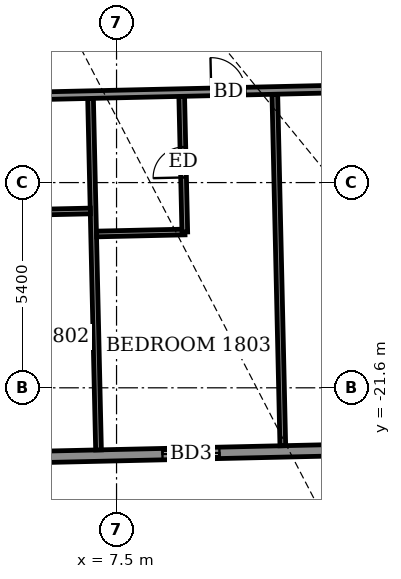
"""IFC4 building model, lengths in metres.
Left out: names, types, materials, properties, quantities, classifications, styles, units other than length and angle.
Written with IfcOpenShell. Run it as: python <this file> out.ifc"""

import sys

from ifc_helpers import new_model, si_unit, direction, frame, frame_2d, origin, place, context, subcontext, project, spatial, rectangle, extrude, element, fill, save


model = new_model("IFC4")
c1 = context("Model", 3, precision=1e-05, world=origin(), true_north=direction((0.0, 1.0)))
c2 = subcontext(c1, "Body", "Model", "MODEL_VIEW")
j1 = project(units=[si_unit("LENGTHUNIT", "METRE"), si_unit("PLANEANGLEUNIT", "RADIAN")], contexts=[c1])
p1 = place(None, origin())
s1 = spatial("IfcSite", under=j1, at=p1, CompositionType="ELEMENT")
p2 = place(p1, origin())
s2 = spatial("IfcBuilding", under=s1, at=p2, CompositionType="ELEMENT")
p3 = place(p2, frame((0.0, 0.0, 74.7)))
s3 = spatial("IfcBuildingStorey", under=s2, at=p3, CompositionType="ELEMENT", Elevation=74.7)
p4 = place(p3, frame((-21.409, -24.029, 0.0), z_axis=(0.0, 0.0, 1.0), x_axis=(0.999742634032, 0.022686244721, 0.0)))
e1 = element("IfcWall", 1, at=p4, inside=s3, PredefinedType="SOLIDWALL", context=c2, shape_type="SweptSolid", body=[
    extrude(rectangle(XDim=46.372, YDim=0.3, at=frame_2d((23.186, 0.0))), origin(), (0.0, 0.0, 1.0), 2.1),
])
p5 = place(p4, frame((3.25, 0.0, 0.0)))
e2 = element("IfcOpeningElement", 2, at=p5, cuts=e1, PredefinedType="OPENING", context=c2, shape_type="SweptSolid", body=[
    extrude(rectangle(XDim=1.5, YDim=2.0, at=frame_2d((0.75, 1.0))), frame((0.0, 0.16, 0.0), z_axis=(0.0, -1.0, 0.0), x_axis=(1.0, 0.0, 0.0)), (0.0, 0.0, 1.0), 0.32),
])
p6 = place(p4, frame((10.575, 0.0, 0.5)))
e3 = element("IfcOpeningElement", 3, at=p6, cuts=e1, PredefinedType="OPENING", context=c2, shape_type="SweptSolid", body=[
    extrude(rectangle(XDim=1.2, YDim=1.1, at=frame_2d((0.6, 0.55))), frame((0.0, 0.16, 0.0), z_axis=(0.0, -1.0, 0.0), x_axis=(1.0, 0.0, 0.0)), (0.0, 0.0, 1.0), 0.32),
])
p7 = place(p4, frame((15.95, 0.0, 0.5)))
e4 = element("IfcOpeningElement", 4, at=p7, cuts=e1, PredefinedType="OPENING", context=c2, shape_type="SweptSolid", body=[
    extrude(rectangle(XDim=1.2, YDim=1.1, at=frame_2d((0.6, 0.55))), frame((0.0, 0.16, 0.0), z_axis=(0.0, -1.0, 0.0), x_axis=(1.0, 0.0, 0.0)), (0.0, 0.0, 1.0), 0.32),
])
p8 = place(p4, frame((20.575, 0.0, 0.0)))
e5 = element("IfcOpeningElement", 5, at=p8, cuts=e1, PredefinedType="OPENING", context=c2, shape_type="SweptSolid", body=[
    extrude(rectangle(XDim=1.5, YDim=2.0, at=frame_2d((0.75, 1.0))), frame((0.0, 0.16, 0.0), z_axis=(0.0, -1.0, 0.0), x_axis=(1.0, 0.0, 0.0)), (0.0, 0.0, 1.0), 0.32),
])
p9 = place(p4, frame((25.35, 0.0, 0.0)))
e6 = element("IfcOpeningElement", 6, at=p9, cuts=e1, PredefinedType="OPENING", context=c2, shape_type="SweptSolid", body=[
    extrude(rectangle(XDim=1.5, YDim=2.0, at=frame_2d((0.75, 1.0))), frame((0.0, 0.16, 0.0), z_axis=(0.0, -1.0, 0.0), x_axis=(1.0, 0.0, 0.0)), (0.0, 0.0, 1.0), 0.32),
])
p10 = place(p4, frame((30.125, 0.0, 0.0)))
e7 = element("IfcOpeningElement", 7, at=p10, cuts=e1, PredefinedType="OPENING", context=c2, shape_type="SweptSolid", body=[
    extrude(rectangle(XDim=1.5, YDim=2.0, at=frame_2d((0.75, 1.0))), frame((0.0, 0.16, 0.0), z_axis=(0.0, -1.0, 0.0), x_axis=(1.0, 0.0, 0.0)), (0.0, 0.0, 1.0), 0.32),
])
p11 = place(p4, frame((36.975, 0.0, 0.5)))
e8 = element("IfcOpeningElement", 8, at=p11, cuts=e1, PredefinedType="OPENING", context=c2, shape_type="SweptSolid", body=[
    extrude(rectangle(XDim=1.2, YDim=1.1, at=frame_2d((0.6, 0.55))), frame((0.0, 0.16, 0.0), z_axis=(0.0, -1.0, 0.0), x_axis=(1.0, 0.0, 0.0)), (0.0, 0.0, 1.0), 0.32),
])
p12 = place(p4, frame((43.115, 0.0, 0.5)))
e9 = element("IfcOpeningElement", 9, at=p12, cuts=e1, PredefinedType="OPENING", context=c2, shape_type="SweptSolid", body=[
    extrude(rectangle(XDim=1.2, YDim=1.1, at=frame_2d((0.6, 0.55))), frame((0.0, 0.16, 0.0), z_axis=(0.0, -1.0, 0.0), x_axis=(1.0, 0.0, 0.0)), (0.0, 0.0, 1.0), 0.32),
])
p13 = place(p3, frame((7.026, -23.234, 0.0), z_axis=(0.0, 0.0, 1.0), x_axis=(-0.022698023584, 0.999742366675, 0.0)))
e10 = element("IfcWall", 10, at=p13, inside=s3, PredefinedType="PARTITIONING", context=c2, shape_type="SweptSolid", body=[
    extrude(rectangle(XDim=9.25, YDim=0.15, at=frame_2d((4.625, 0.0))), origin(), (0.0, 0.0, 1.0), 2.35),
])
p14 = place(p3, frame((11.875, -23.124, 0.0), z_axis=(0.0, 0.0, 1.0), x_axis=(-0.022697424684, 0.999742380272, 0.0)))
e11 = element("IfcWall", 11, at=p14, inside=s3, PredefinedType="PARTITIONING", context=c2, shape_type="SweptSolid", body=[
    extrude(rectangle(XDim=9.25, YDim=0.15, at=frame_2d((4.625, 0.0))), origin(), (0.0, 0.0, 1.0), 2.1),
])
p15 = place(p3, frame((6.976, -17.553, 0.0), z_axis=(0.0, 0.0, 1.0), x_axis=(0.999740260747, 0.02279059109, 0.0)))
e12 = element("IfcWall", 12, at=p15, inside=s3, PredefinedType="PARTITIONING", context=c2, shape_type="SweptSolid", body=[
    extrude(rectangle(XDim=2.324, YDim=0.15, at=frame_2d((1.162, 0.0))), origin(), (0.0, 0.0, 1.0), 2.35),
])
p16 = place(p3, frame((9.296, -17.5, 0.0), z_axis=(0.0, 0.0, 1.0), x_axis=(-0.022635966146, 0.999743773692, 0.0)))
e13 = element("IfcWall", 13, at=p16, inside=s3, PredefinedType="PARTITIONING", context=c2, shape_type="SweptSolid", body=[
    extrude(rectangle(XDim=3.57, YDim=0.15, at=frame_2d((1.785, 0.0))), origin(), (0.0, 0.0, 1.0), 2.35),
])
p17 = place(p16, frame((1.435, 0.0, 0.0)))
e14 = element("IfcOpeningElement", 14, at=p17, cuts=e13, PredefinedType="OPENING", context=c2, shape_type="SweptSolid", body=[
    extrude(rectangle(XDim=0.8, YDim=2.1, at=frame_2d((0.4, 1.05))), frame((0.0, 0.085, 0.0), z_axis=(0.0, -1.0, 0.0), x_axis=(1.0, 0.0, 0.0)), (0.0, 0.0, 1.0), 0.17),
])
p18 = place(p3, frame((4.488, -16.999, 0.0), z_axis=(0.0, 0.0, 1.0), x_axis=(0.999749744571, 0.022370700241, 0.0)))
e15 = element("IfcWall", 15, at=p18, inside=s3, PredefinedType="PARTITIONING", context=c2, shape_type="SweptSolid", body=[
    extrude(rectangle(XDim=2.324, YDim=0.15, at=frame_2d((1.162, 0.0))), origin(), (0.0, 0.0, 1.0), 2.45),
])
p19 = place(p3, frame((-24.88, -14.605, 0.0), z_axis=(0.0, 0.0, 1.0), x_axis=(0.999742652859, 0.022685415006, 0.0)))
e16 = element("IfcWall", 16, at=p19, inside=s3, PredefinedType="PARTITIONING", context=c2, shape_type="SweptSolid", body=[
    extrude(rectangle(XDim=53.778, YDim=0.2, at=frame_2d((26.889, 0.0))), origin(), (0.0, 0.0, 1.0), 2.1),
])
p20 = place(p19, frame((3.256, 0.0, 0.0)))
e17 = element("IfcOpeningElement", 17, at=p20, cuts=e16, PredefinedType="OPENING", context=c2, shape_type="SweptSolid", body=[
    extrude(rectangle(XDim=1.0, YDim=2.1, at=frame_2d((0.5, 1.05))), frame((0.0, 0.11, 0.0), z_axis=(0.0, -1.0, 0.0), x_axis=(1.0, 0.0, 0.0)), (0.0, 0.0, 1.0), 0.22),
])
p21 = place(p19, frame((9.756, 0.0, 0.0)))
e18 = element("IfcOpeningElement", 18, at=p21, cuts=e16, PredefinedType="OPENING", context=c2, shape_type="SweptSolid", body=[
    extrude(rectangle(XDim=0.9, YDim=2.1, at=frame_2d((0.45, 1.05))), frame((0.0, 0.11, 0.0), z_axis=(0.0, -1.0, 0.0), x_axis=(1.0, 0.0, 0.0)), (0.0, 0.0, 1.0), 0.22),
])
p22 = place(p19, frame((15.131, 0.0, 0.0)))
e19 = element("IfcOpeningElement", 19, at=p22, cuts=e16, PredefinedType="OPENING", context=c2, shape_type="SweptSolid", body=[
    extrude(rectangle(XDim=1.0, YDim=2.1, at=frame_2d((0.5, 1.05))), frame((0.0, 0.11, 0.0), z_axis=(0.0, -1.0, 0.0), x_axis=(1.0, 0.0, 0.0)), (0.0, 0.0, 1.0), 0.22),
])
p23 = place(p19, frame((12.156, 0.0, 0.0)))
e20 = element("IfcOpeningElement", 20, at=p23, cuts=e16, PredefinedType="OPENING", context=c2, shape_type="SweptSolid", body=[
    extrude(rectangle(XDim=0.9, YDim=2.1, at=frame_2d((0.45, 1.05))), frame((0.0, 0.11, 0.0), z_axis=(0.0, -1.0, 0.0), x_axis=(1.0, 0.0, 0.0)), (0.0, 0.0, 1.0), 0.22),
])
p24 = place(p19, frame((18.006, 0.0, 0.0)))
e21 = element("IfcOpeningElement", 21, at=p24, cuts=e16, PredefinedType="OPENING", context=c2, shape_type="SweptSolid", body=[
    extrude(rectangle(XDim=1.0, YDim=2.1, at=frame_2d((0.5, 1.05))), frame((0.0, 0.11, 0.0), z_axis=(0.0, -1.0, 0.0), x_axis=(1.0, 0.0, 0.0)), (0.0, 0.0, 1.0), 0.22),
])
p25 = place(p19, frame((20.406, 0.0, 0.0)))
e22 = element("IfcOpeningElement", 22, at=p25, cuts=e16, PredefinedType="OPENING", context=c2, shape_type="SweptSolid", body=[
    extrude(rectangle(XDim=0.9, YDim=2.1, at=frame_2d((0.45, 1.05))), frame((0.0, 0.11, 0.0), z_axis=(0.0, -1.0, 0.0), x_axis=(1.0, 0.0, 0.0)), (0.0, 0.0, 1.0), 0.22),
])
p26 = place(p19, frame((25.331, 0.0, 0.0)))
e23 = element("IfcOpeningElement", 23, at=p26, cuts=e16, PredefinedType="OPENING", context=c2, shape_type="SweptSolid", body=[
    extrude(rectangle(XDim=0.9, YDim=2.1, at=frame_2d((0.45, 1.05))), frame((0.0, 0.11, 0.0), z_axis=(0.0, -1.0, 0.0), x_axis=(1.0, 0.0, 0.0)), (0.0, 0.0, 1.0), 0.22),
])
p27 = place(p19, frame((27.706, 0.0, 0.0)))
e24 = element("IfcOpeningElement", 24, at=p27, cuts=e16, PredefinedType="OPENING", context=c2, shape_type="SweptSolid", body=[
    extrude(rectangle(XDim=0.9, YDim=2.1, at=frame_2d((0.45, 1.05))), frame((0.0, 0.11, 0.0), z_axis=(0.0, -1.0, 0.0), x_axis=(1.0, 0.0, 0.0)), (0.0, 0.0, 1.0), 0.22),
])
p28 = place(p19, frame((34.881, 0.0, 0.0)))
e25 = element("IfcOpeningElement", 25, at=p28, cuts=e16, PredefinedType="OPENING", context=c2, shape_type="SweptSolid", body=[
    extrude(rectangle(XDim=0.9, YDim=2.1, at=frame_2d((0.45, 1.05))), frame((0.0, 0.11, 0.0), z_axis=(0.0, -1.0, 0.0), x_axis=(1.0, 0.0, 0.0)), (0.0, 0.0, 1.0), 0.22),
])
p29 = place(p19, frame((40.331, 0.0, 0.0)))
e26 = element("IfcOpeningElement", 26, at=p29, cuts=e16, PredefinedType="OPENING", context=c2, shape_type="SweptSolid", body=[
    extrude(rectangle(XDim=1.0, YDim=2.1, at=frame_2d((0.5, 1.05))), frame((0.0, 0.11, 0.0), z_axis=(0.0, -1.0, 0.0), x_axis=(1.0, 0.0, 0.0)), (0.0, 0.0, 1.0), 0.22),
])
p30 = place(p19, frame((50.842, 0.0, 0.0)))
e27 = element("IfcOpeningElement", 27, at=p30, cuts=e16, PredefinedType="OPENING", context=c2, shape_type="SweptSolid", body=[
    extrude(rectangle(XDim=1.0, YDim=2.1, at=frame_2d((0.5, 1.05))), frame((0.0, 0.11, 0.0), z_axis=(0.0, -1.0, 0.0), x_axis=(1.0, 0.0, 0.0)), (0.0, 0.0, 1.0), 0.22),
])
p31 = place(p19, frame((45.856, 0.0, 0.0)))
e28 = element("IfcOpeningElement", 28, at=p31, cuts=e16, PredefinedType="OPENING", context=c2, shape_type="SweptSolid", body=[
    extrude(rectangle(XDim=0.9, YDim=2.1, at=frame_2d((0.45, 1.05))), frame((0.0, 0.11, 0.0), z_axis=(0.0, -1.0, 0.0), x_axis=(1.0, 0.0, 0.0)), (0.0, 0.0, 1.0), 0.22),
])
p32 = place(p10, origin())
e29 = element("IfcDoor", 29, at=p32, inside=s3, OperationType="SLIDING_TO_LEFT", PredefinedType="DOOR", context=c2, shape_type="SweptSolid", body=[
    extrude(rectangle(XDim=1.5, YDim=2.0, at=frame_2d((0.75, 1.0))), frame((0.0, 0.025, 0.0), z_axis=(0.0, -1.0, 0.0), x_axis=(1.0, 0.0, 0.0)), (0.0, 0.0, 1.0), 0.05),
])
fill(e7, e29)
p33 = place(p28, origin())
e30 = element("IfcDoor", 30, at=p33, inside=s3, OperationType="SINGLE_SWING_LEFT", PredefinedType="DOOR", context=c2, shape_type="SweptSolid", body=[
    extrude(rectangle(XDim=0.9, YDim=2.1, at=frame_2d((0.45, 1.05))), frame((0.0, 0.025, 0.0), z_axis=(0.0, -1.0, 0.0), x_axis=(1.0, 0.0, 0.0)), (0.0, 0.0, 1.0), 0.05),
])
fill(e25, e30)
p34 = place(p17, origin())
e31 = element("IfcDoor", 31, at=p34, inside=s3, OperationType="SINGLE_SWING_LEFT", PredefinedType="DOOR", context=c2, shape_type="SweptSolid", body=[
    extrude(rectangle(XDim=0.8, YDim=2.1, at=frame_2d((0.4, 1.05))), frame((0.0, 0.025, 0.0), z_axis=(0.0, -1.0, 0.0), x_axis=(1.0, 0.0, 0.0)), (0.0, 0.0, 1.0), 0.05),
])
fill(e14, e31)
save(model, sys.argv[1])
